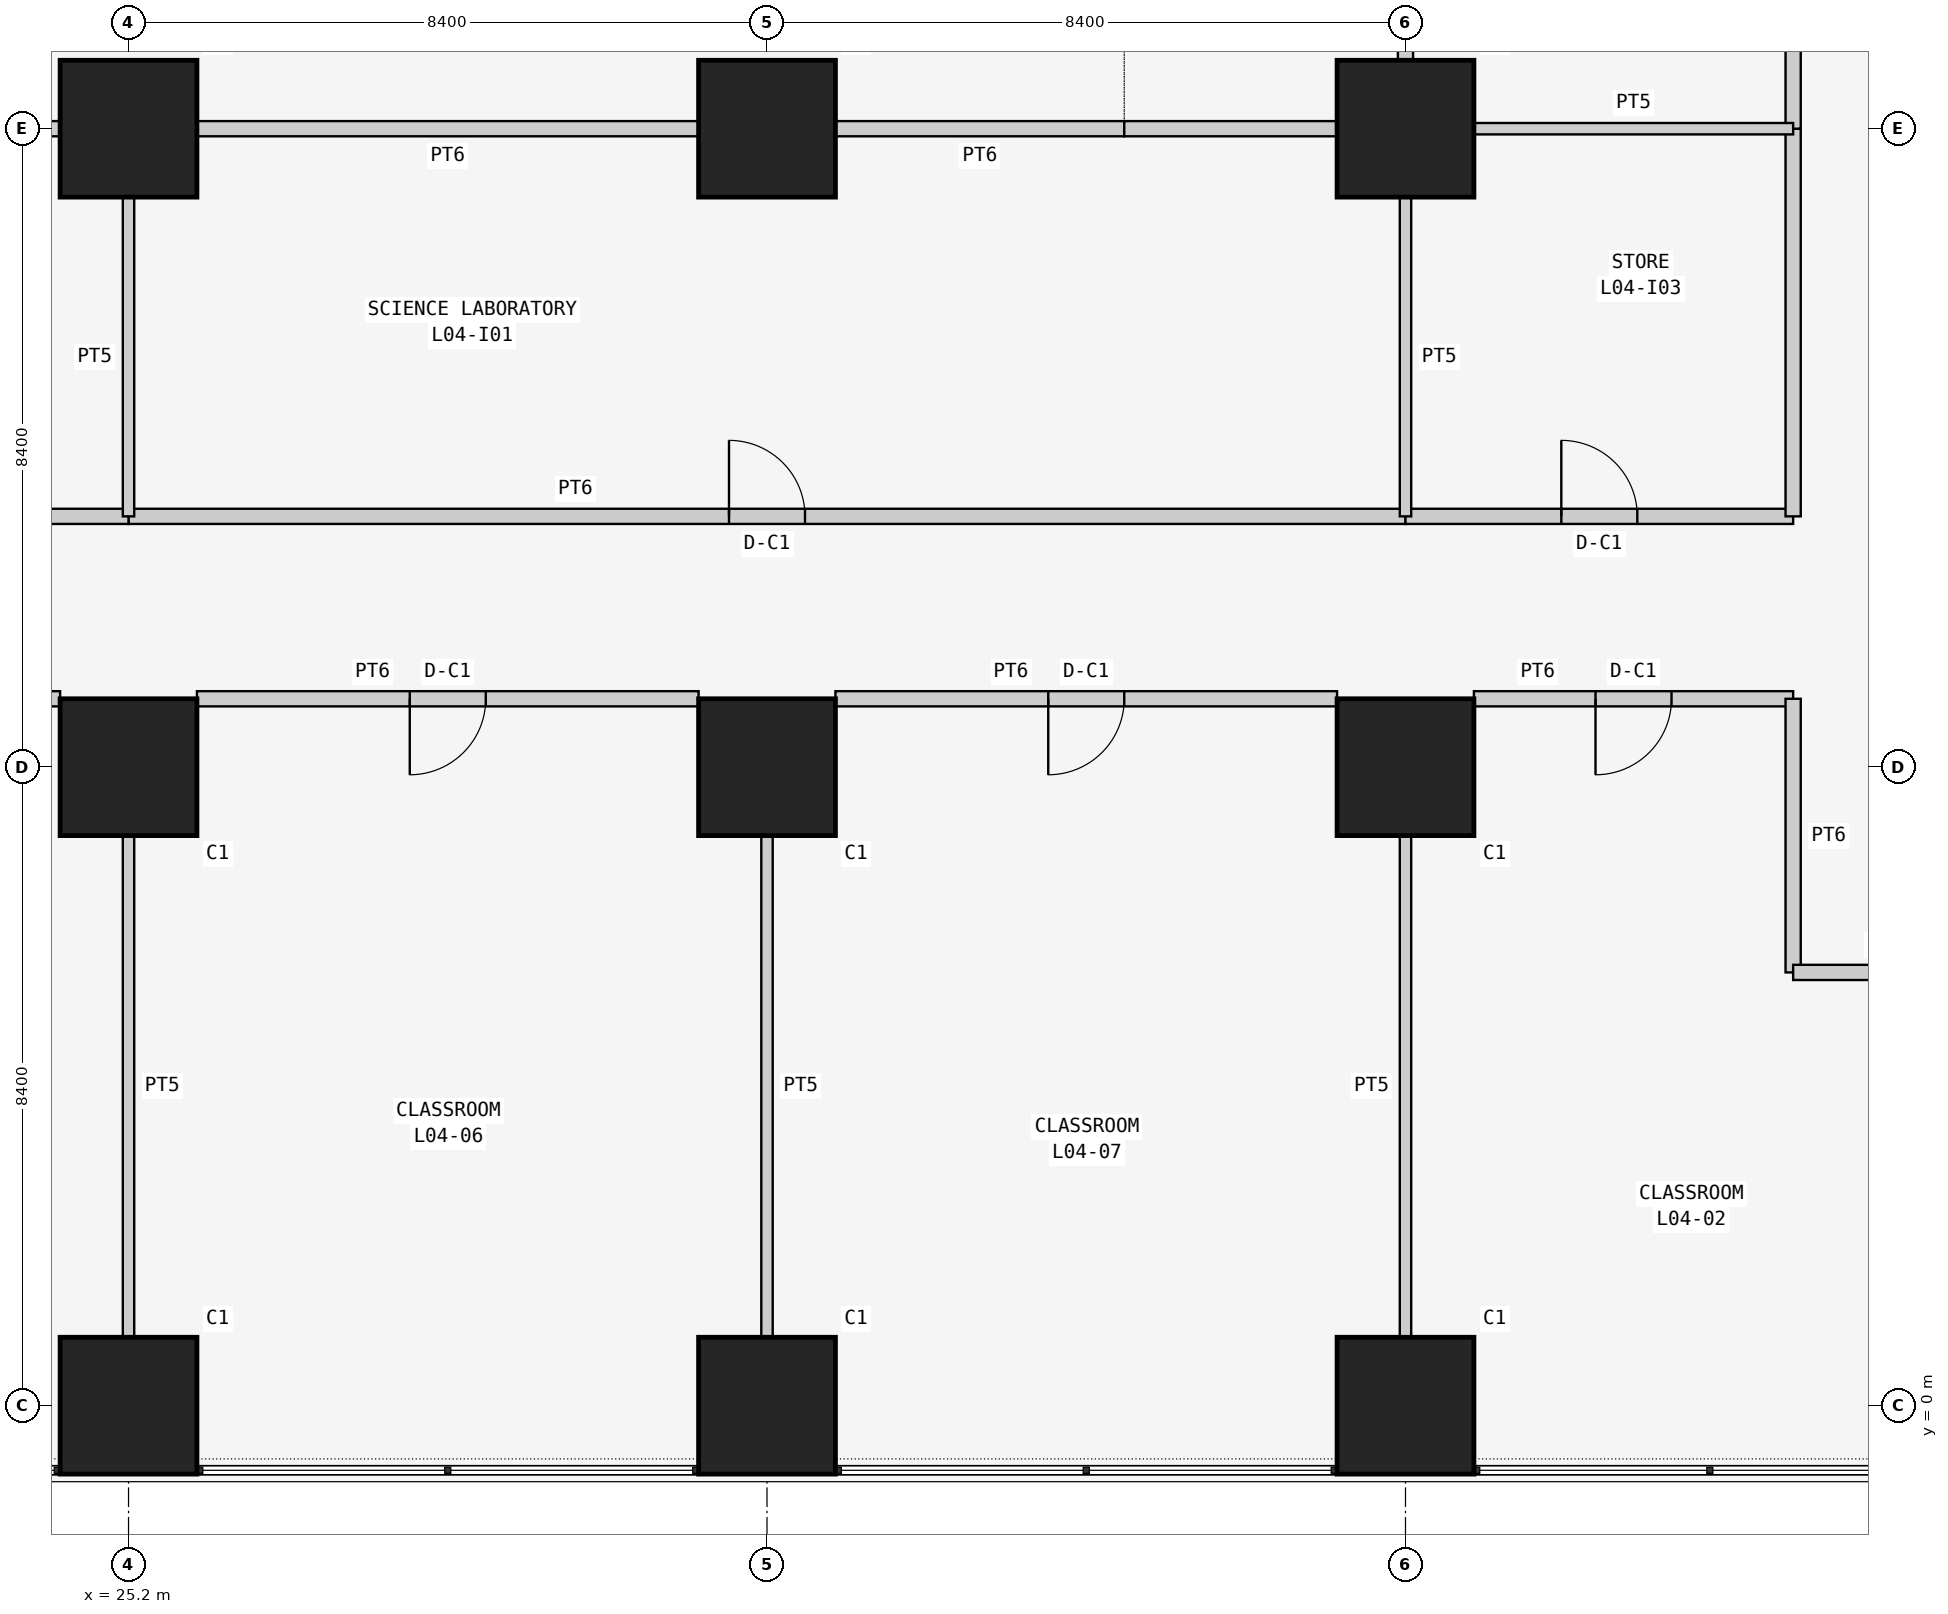
"""IFC4 building model, lengths in metres.
Left out: names, types, materials, properties, quantities, classifications, styles, units other than length and angle.
Written with IfcOpenShell. Run it as: python <this file> out.ifc"""

import sys

from ifc_helpers import new_model, si_unit, direction, frame, frame_2d, origin, origin_2d, place, context, subcontext, project, spatial, rectangle, extrude, element, fill, save


model = new_model("IFC4")
c1 = context("Model", 3, precision=1e-05, world=origin(), true_north=direction((0.0, 1.0)))
c2 = subcontext(c1, "Body", "Model", "MODEL_VIEW")
j1 = project(units=[si_unit("LENGTHUNIT", "METRE"), si_unit("PLANEANGLEUNIT", "RADIAN")], contexts=[c1])
p1 = place(None, origin())
s1 = spatial("IfcSite", under=j1, at=p1, CompositionType="ELEMENT")
p2 = place(p1, origin())
s2 = spatial("IfcBuilding", under=s1, at=p2, CompositionType="ELEMENT")
p3 = place(p2, frame((0.0, 0.0, 19.5)))
s3 = spatial("IfcBuildingStorey", under=s2, at=p3, CompositionType="ELEMENT", Elevation=19.5)
for number, where, z_axis, x_axis in (
    (1, (25.2, 0.0, 0.0), (0.0, 0.0, 1.0), (1.0, 0.0, 0.0)),
    (2, (25.2, 8.4, 0.0), (0.0, 0.0, 1.0), (1.0, 0.0, 0.0)),
    (3, (25.2, 16.8, 0.0), (0.0, 0.0, 1.0), (1.0, 0.0, 0.0)),
    (4, (33.6, 0.0, 0.0), (0.0, 0.0, 1.0), (1.0, 0.0, 0.0)),
    (5, (33.6, 8.4, 0.0), (0.0, 0.0, 1.0), (1.0, 0.0, 0.0)),
    (6, (33.6, 16.8, 0.0), (0.0, 0.0, 1.0), (1.0, 0.0, 0.0)),
    (7, (42.0, 0.0, 0.0), (0.0, 0.0, 1.0), (1.0, 0.0, 0.0)),
    (8, (42.0, 8.4, 0.0), (0.0, 0.0, 1.0), (1.0, 0.0, 0.0)),
    (9, (42.0, 16.8, 0.0), (0.0, 0.0, 1.0), (1.0, 0.0, 0.0)),
):
    element("IfcColumn", number, at=place(p3, frame(where, z_axis=z_axis, x_axis=x_axis)), inside=s3, PredefinedType="COLUMN", context=c2, shape_type="SweptSolid", body=[
        extrude(rectangle(XDim=1.8, YDim=1.8, at=origin_2d()), origin(), (0.0, 0.0, 1.0), 4.5),
    ])
p4 = place(p3, frame((42.0, 0.9, 0.0), z_axis=(0.0, 0.0, 1.0), x_axis=(0.0, 1.0, 0.0)))
e10 = element("IfcWall", 10, at=p4, inside=s3, PredefinedType="PARTITIONING", context=c2, shape_type="SweptSolid", body=[
    extrude(rectangle(XDim=6.6, YDim=0.15, at=frame_2d((3.3, 0.0))), origin(), (0.0, 0.0, 1.0), 3.543),
])
p5 = place(p3, frame((42.9, 9.3, 0.0), z_axis=(0.0, 0.0, 1.0), x_axis=(1.0, 0.0, 0.0)))
e11 = element("IfcWall", 11, at=p5, inside=s3, PredefinedType="PARTITIONING", context=c2, shape_type="SweptSolid", body=[
    extrude(rectangle(XDim=4.2, YDim=0.2, at=frame_2d((2.1, 0.0))), origin(), (0.0, 0.0, 1.0), 4.3),
])
p6 = place(p5, frame((1.6, 0.0, 0.0)))
e12 = element("IfcOpeningElement", 12, at=p6, cuts=e11, PredefinedType="OPENING", context=c2, shape_type="SweptSolid", body=[
    extrude(rectangle(XDim=1.0, YDim=2.1, at=frame_2d((0.5, 1.05))), frame((0.0, 0.11, 0.0), z_axis=(0.0, -1.0, 0.0), x_axis=(1.0, 0.0, 0.0)), (0.0, 0.0, 1.0), 0.22),
])
p7 = place(p3, frame((47.1, 9.3, 0.0), z_axis=(0.0, 0.0, 1.0), x_axis=(0.0, -1.0, 0.0)))
e13 = element("IfcWall", 13, at=p7, inside=s3, PredefinedType="PARTITIONING", context=c2, shape_type="SweptSolid", body=[
    extrude(rectangle(XDim=3.6, YDim=0.2, at=frame_2d((1.8, 0.0))), origin(), (0.0, 0.0, 1.0), 4.3),
])
p8 = place(p3, frame((47.1, 5.7, 0.0), z_axis=(0.0, 0.0, 1.0), x_axis=(1.0, 0.0, 0.0)))
e14 = element("IfcWall", 14, at=p8, inside=s3, PredefinedType="PARTITIONING", context=c2, shape_type="SweptSolid", body=[
    extrude(rectangle(XDim=2.4, YDim=0.2, at=frame_2d((1.2, 0.0))), origin(), (0.0, 0.0, 1.0), 4.3),
])
p9 = place(p3, frame((25.2, 7.5, 0.0), z_axis=(0.0, 0.0, 1.0), x_axis=(0.0, -1.0, 0.0)))
e15 = element("IfcWall", 15, at=p9, inside=s3, PredefinedType="PARTITIONING", context=c2, shape_type="SweptSolid", body=[
    extrude(rectangle(XDim=6.6, YDim=0.15, at=frame_2d((3.3, 0.0))), origin(), (0.0, 0.0, 1.0), 3.543),
])
p10 = place(p3, frame((17.7, 9.3, 0.0), z_axis=(0.0, 0.0, 1.0), x_axis=(1.0, 0.0, 0.0)))
e16 = element("IfcWall", 16, at=p10, inside=s3, PredefinedType="PARTITIONING", context=c2, shape_type="SweptSolid", body=[
    extrude(rectangle(XDim=6.6, YDim=0.2, at=frame_2d((3.3, 0.0))), origin(), (0.0, 0.0, 1.0), 4.3),
])
p11 = place(p10, frame((2.8, 0.0, 0.0)))
e17 = element("IfcOpeningElement", 17, at=p11, cuts=e16, PredefinedType="OPENING", context=c2, shape_type="SweptSolid", body=[
    extrude(rectangle(XDim=1.0, YDim=2.1, at=frame_2d((0.5, 1.05))), frame((0.0, 0.11, 0.0), z_axis=(0.0, -1.0, 0.0), x_axis=(1.0, 0.0, 0.0)), (0.0, 0.0, 1.0), 0.22),
])
p12 = place(p3, frame((33.6, 7.5, 0.0), z_axis=(0.0, 0.0, 1.0), x_axis=(0.0, -1.0, 0.0)))
e18 = element("IfcWall", 18, at=p12, inside=s3, PredefinedType="PARTITIONING", context=c2, shape_type="SweptSolid", body=[
    extrude(rectangle(XDim=6.6, YDim=0.15, at=frame_2d((3.3, 0.0))), origin(), (0.0, 0.0, 1.0), 3.543),
])
p13 = place(p3, frame((26.1, 9.3, 0.0), z_axis=(0.0, 0.0, 1.0), x_axis=(1.0, 0.0, 0.0)))
e19 = element("IfcWall", 19, at=p13, inside=s3, PredefinedType="PARTITIONING", context=c2, shape_type="SweptSolid", body=[
    extrude(rectangle(XDim=6.6, YDim=0.2, at=frame_2d((3.3, 0.0))), origin(), (0.0, 0.0, 1.0), 4.3),
])
p14 = place(p13, frame((2.8, 0.0, 0.0)))
e20 = element("IfcOpeningElement", 20, at=p14, cuts=e19, PredefinedType="OPENING", context=c2, shape_type="SweptSolid", body=[
    extrude(rectangle(XDim=1.0, YDim=2.1, at=frame_2d((0.5, 1.05))), frame((0.0, 0.11, 0.0), z_axis=(0.0, -1.0, 0.0), x_axis=(1.0, 0.0, 0.0)), (0.0, 0.0, 1.0), 0.22),
])
p15 = place(p3, frame((34.5, 9.3, 0.0), z_axis=(0.0, 0.0, 1.0), x_axis=(1.0, 0.0, 0.0)))
e21 = element("IfcWall", 21, at=p15, inside=s3, PredefinedType="PARTITIONING", context=c2, shape_type="SweptSolid", body=[
    extrude(rectangle(XDim=6.6, YDim=0.2, at=frame_2d((3.3, 0.0))), origin(), (0.0, 0.0, 1.0), 4.3),
])
p16 = place(p15, frame((2.8, 0.0, 0.0)))
e22 = element("IfcOpeningElement", 22, at=p16, cuts=e21, PredefinedType="OPENING", context=c2, shape_type="SweptSolid", body=[
    extrude(rectangle(XDim=1.0, YDim=2.1, at=frame_2d((0.5, 1.05))), frame((0.0, 0.11, 0.0), z_axis=(0.0, -1.0, 0.0), x_axis=(1.0, 0.0, 0.0)), (0.0, 0.0, 1.0), 0.22),
])
p17 = place(p3, frame((25.2, 11.7, 0.0), z_axis=(0.0, 0.0, 1.0), x_axis=(1.0, 0.0, 0.0)))
e23 = element("IfcWall", 23, at=p17, inside=s3, PredefinedType="PARTITIONING", context=c2, shape_type="SweptSolid", body=[
    extrude(rectangle(XDim=16.8, YDim=0.2, at=frame_2d((8.4, 0.0))), origin(), (0.0, 0.0, 1.0), 4.3),
])
p18 = place(p17, frame((7.9, 0.0, 0.0)))
e24 = element("IfcOpeningElement", 24, at=p18, cuts=e23, PredefinedType="OPENING", context=c2, shape_type="SweptSolid", body=[
    extrude(rectangle(XDim=1.0, YDim=2.1, at=frame_2d((0.5, 1.05))), frame((0.0, 0.11, 0.0), z_axis=(0.0, -1.0, 0.0), x_axis=(1.0, 0.0, 0.0)), (0.0, 0.0, 1.0), 0.22),
])
p19 = place(p3, frame((11.7, 11.7, 0.0), z_axis=(0.0, 0.0, 1.0), x_axis=(1.0, 0.0, 0.0)))
e25 = element("IfcWall", 25, at=p19, inside=s3, PredefinedType="PARTITIONING", context=c2, shape_type="SweptSolid", body=[
    extrude(rectangle(XDim=13.5, YDim=0.2, at=frame_2d((6.75, 0.0))), origin(), (0.0, 0.0, 1.0), 4.3),
])
p20 = place(p19, frame((6.25, 0.0, 0.0)))
e26 = element("IfcOpeningElement", 26, at=p20, cuts=e25, PredefinedType="OPENING", context=c2, shape_type="SweptSolid", body=[
    extrude(rectangle(XDim=1.0, YDim=2.1, at=frame_2d((0.5, 1.05))), frame((0.0, 0.11, 0.0), z_axis=(0.0, -1.0, 0.0), x_axis=(1.0, 0.0, 0.0)), (0.0, 0.0, 1.0), 0.22),
])
p21 = place(p3, frame((42.0, 11.7, 0.0), z_axis=(0.0, 0.0, 1.0), x_axis=(1.0, 0.0, 0.0)))
e27 = element("IfcWall", 27, at=p21, inside=s3, PredefinedType="PARTITIONING", context=c2, shape_type="SweptSolid", body=[
    extrude(rectangle(XDim=5.1, YDim=0.2, at=frame_2d((2.55, 0.0))), origin(), (0.0, 0.0, 1.0), 4.3),
])
p22 = place(p21, frame((2.05, 0.0, 0.0)))
e28 = element("IfcOpeningElement", 28, at=p22, cuts=e27, PredefinedType="OPENING", context=c2, shape_type="SweptSolid", body=[
    extrude(rectangle(XDim=1.0, YDim=2.1, at=frame_2d((0.5, 1.05))), frame((0.0, 0.11, 0.0), z_axis=(0.0, -1.0, 0.0), x_axis=(1.0, 0.0, 0.0)), (0.0, 0.0, 1.0), 0.22),
])
p23 = place(p3, frame((47.1, 11.7, 0.0), z_axis=(0.0, 0.0, 1.0), x_axis=(0.0, 1.0, 0.0)))
e29 = element("IfcWall", 29, at=p23, inside=s3, PredefinedType="PARTITIONING", context=c2, shape_type="SweptSolid", body=[
    extrude(rectangle(XDim=5.1, YDim=0.2, at=frame_2d((2.55, 0.0))), origin(), (0.0, 0.0, 1.0), 4.3),
])
p24 = place(p3, frame((47.1, 16.8, 0.0), z_axis=(0.0, 0.0, 1.0), x_axis=(0.0, 1.0, 0.0)))
e30 = element("IfcWall", 30, at=p24, inside=s3, PredefinedType="PARTITIONING", context=c2, shape_type="SweptSolid", body=[
    extrude(rectangle(XDim=8.4, YDim=0.2, at=frame_2d((4.2, 0.0))), origin(), (0.0, 0.0, 1.0), 4.3),
])
p25 = place(p24, frame((3.7, 0.0, 0.0)))
e31 = element("IfcOpeningElement", 31, at=p25, cuts=e30, PredefinedType="OPENING", context=c2, shape_type="SweptSolid", body=[
    extrude(rectangle(XDim=1.0, YDim=2.1, at=frame_2d((0.5, 1.05))), frame((0.0, 0.11, 0.0), z_axis=(0.0, -1.0, 0.0), x_axis=(1.0, 0.0, 0.0)), (0.0, 0.0, 1.0), 0.22),
])
p26 = place(p3, frame((32.7, 16.8, 0.0), z_axis=(0.0, 0.0, 1.0), x_axis=(-1.0, 0.0, 0.0)))
e32 = element("IfcWall", 32, at=p26, inside=s3, PredefinedType="PARTITIONING", context=c2, shape_type="SweptSolid", body=[
    extrude(rectangle(XDim=6.6, YDim=0.2, at=frame_2d((3.3, 0.0))), origin(), (0.0, 0.0, 1.0), 3.543),
])
p27 = place(p3, frame((38.3, 16.8, 0.0), z_axis=(0.0, 0.0, 1.0), x_axis=(-1.0, 0.0, 0.0)))
e33 = element("IfcWall", 33, at=p27, inside=s3, PredefinedType="PARTITIONING", context=c2, shape_type="SweptSolid", body=[
    extrude(rectangle(XDim=3.8, YDim=0.2, at=frame_2d((1.9, 0.0))), origin(), (0.0, 0.0, 1.0), 3.543),
])
p28 = place(p3, frame((24.3, 16.8, 0.0), z_axis=(0.0, 0.0, 1.0), x_axis=(-1.0, 0.0, 0.0)))
e34 = element("IfcWall", 34, at=p28, inside=s3, PredefinedType="PARTITIONING", context=c2, shape_type="SweptSolid", body=[
    extrude(rectangle(XDim=6.6, YDim=0.2, at=frame_2d((3.3, 0.0))), origin(), (0.0, 0.0, 1.0), 3.543),
])
p29 = place(p3, frame((41.1, 16.8, 0.0), z_axis=(0.0, 0.0, 1.0), x_axis=(-1.0, 0.0, 0.0)))
e35 = element("IfcWall", 35, at=p29, inside=s3, PredefinedType="PARTITIONING", context=c2, shape_type="SweptSolid", body=[
    extrude(rectangle(XDim=2.8, YDim=0.2, at=frame_2d((1.4, 0.0))), origin(), (0.0, 0.0, 1.0), 3.543),
])
p30 = place(p3, frame((42.0, 24.3, 0.0), z_axis=(0.0, 0.0, 1.0), x_axis=(0.0, -1.0, 0.0)))
e36 = element("IfcWall", 36, at=p30, inside=s3, PredefinedType="PARTITIONING", context=c2, shape_type="SweptSolid", body=[
    extrude(rectangle(XDim=6.6, YDim=0.2, at=frame_2d((3.3, 0.0))), origin(), (0.0, 0.0, 1.0), 3.543),
])
for number, where, z_axis, x_axis in (
    (37, (25.2, 11.7, 0.0), (0.0, 0.0, 1.0), (0.0, 1.0, 0.0)),
    (38, (42.0, 15.9, 0.0), (0.0, 0.0, 1.0), (0.0, -1.0, 0.0)),
):
    element("IfcWall", number, at=place(p3, frame(where, z_axis=z_axis, x_axis=x_axis)), inside=s3, PredefinedType="PARTITIONING", context=c2, shape_type="SweptSolid", body=[
        extrude(rectangle(XDim=4.2, YDim=0.15, at=frame_2d((2.1, 0.0))), origin(), (0.0, 0.0, 1.0), 3.543),
    ])
p31 = place(p3, frame((42.9, 16.8, 0.0), z_axis=(0.0, 0.0, 1.0), x_axis=(1.0, 0.0, 0.0)))
e39 = element("IfcWall", 39, at=p31, inside=s3, PredefinedType="PARTITIONING", context=c2, shape_type="SweptSolid", body=[
    extrude(rectangle(XDim=4.2, YDim=0.15, at=frame_2d((2.1, 0.0))), origin(), (0.0, 0.0, 1.0), 3.543),
])
p32 = place(p6, frame((1.0, 0.0, 0.0), z_axis=(0.0, 0.0, 1.0), x_axis=(-1.0, 0.0, 0.0)))
e40 = element("IfcDoor", 40, at=p32, inside=s3, OperationType="SINGLE_SWING_RIGHT", PredefinedType="DOOR", context=c2, shape_type="SweptSolid", body=[
    extrude(rectangle(XDim=1.0, YDim=2.1, at=frame_2d((0.5, 1.05))), frame((0.0, 0.025, 0.0), z_axis=(0.0, -1.0, 0.0), x_axis=(1.0, 0.0, 0.0)), (0.0, 0.0, 1.0), 0.05),
])
fill(e12, e40)
p33 = place(p14, frame((1.0, 0.0, 0.0), z_axis=(0.0, 0.0, 1.0), x_axis=(-1.0, 0.0, 0.0)))
e41 = element("IfcDoor", 41, at=p33, inside=s3, OperationType="SINGLE_SWING_RIGHT", PredefinedType="DOOR", context=c2, shape_type="SweptSolid", body=[
    extrude(rectangle(XDim=1.0, YDim=2.1, at=frame_2d((0.5, 1.05))), frame((0.0, 0.025, 0.0), z_axis=(0.0, -1.0, 0.0), x_axis=(1.0, 0.0, 0.0)), (0.0, 0.0, 1.0), 0.05),
])
fill(e20, e41)
p34 = place(p16, frame((1.0, 0.0, 0.0), z_axis=(0.0, 0.0, 1.0), x_axis=(-1.0, 0.0, 0.0)))
e42 = element("IfcDoor", 42, at=p34, inside=s3, OperationType="SINGLE_SWING_RIGHT", PredefinedType="DOOR", context=c2, shape_type="SweptSolid", body=[
    extrude(rectangle(XDim=1.0, YDim=2.1, at=frame_2d((0.5, 1.05))), frame((0.0, 0.025, 0.0), z_axis=(0.0, -1.0, 0.0), x_axis=(1.0, 0.0, 0.0)), (0.0, 0.0, 1.0), 0.05),
])
fill(e22, e42)
p35 = place(p18, origin())
e43 = element("IfcDoor", 43, at=p35, inside=s3, OperationType="SINGLE_SWING_LEFT", PredefinedType="DOOR", context=c2, shape_type="SweptSolid", body=[
    extrude(rectangle(XDim=1.0, YDim=2.1, at=frame_2d((0.5, 1.05))), frame((0.0, 0.025, 0.0), z_axis=(0.0, -1.0, 0.0), x_axis=(1.0, 0.0, 0.0)), (0.0, 0.0, 1.0), 0.05),
])
fill(e24, e43)
p36 = place(p22, origin())
e44 = element("IfcDoor", 44, at=p36, inside=s3, OperationType="SINGLE_SWING_LEFT", PredefinedType="DOOR", context=c2, shape_type="SweptSolid", body=[
    extrude(rectangle(XDim=1.0, YDim=2.1, at=frame_2d((0.5, 1.05))), frame((0.0, 0.025, 0.0), z_axis=(0.0, -1.0, 0.0), x_axis=(1.0, 0.0, 0.0)), (0.0, 0.0, 1.0), 0.05),
])
fill(e28, e44)
save(model, sys.argv[1])
